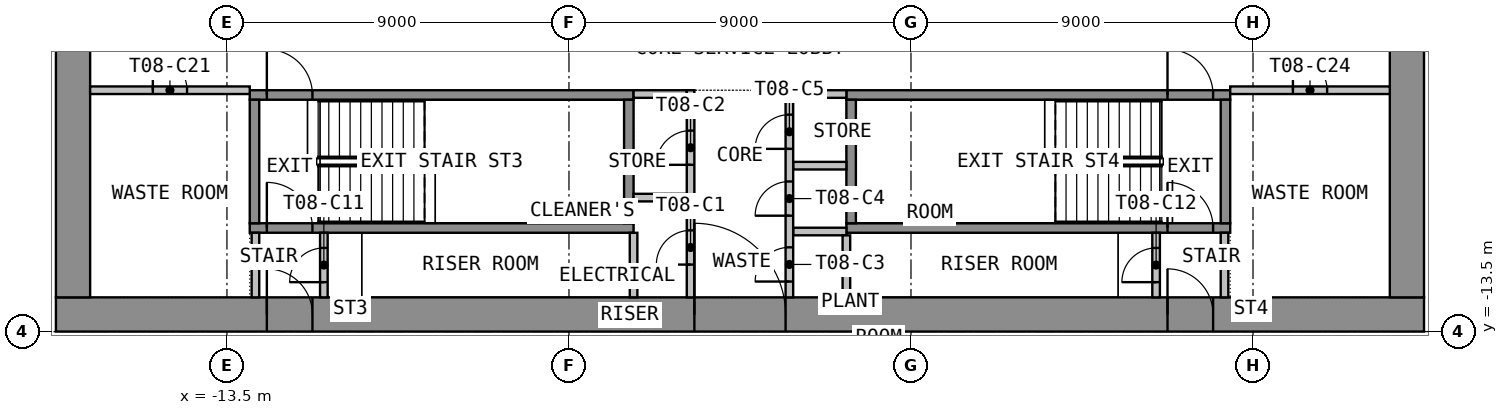
"""IFC4 building model, lengths in metres.
Left out: names, types, materials, properties, quantities, classifications, styles, units other than length and angle.
Written with IfcOpenShell. Run it as: python <this file> out.ifc"""

import sys

from ifc_helpers import new_model, si_unit, direction, frame, frame_2d, origin, place, context, subcontext, project, spatial, rectangle, extrude, element, fill, save


model = new_model("IFC4")
c1 = context("Model", 3, precision=1e-05, world=origin(), true_north=direction((0.0, 1.0)))
c2 = subcontext(c1, "Body", "Model", "MODEL_VIEW")
j1 = project(units=[si_unit("LENGTHUNIT", "METRE"), si_unit("PLANEANGLEUNIT", "RADIAN")], contexts=[c1])
p1 = place(None, origin())
s1 = spatial("IfcSite", under=j1, at=p1, CompositionType="ELEMENT")
p2 = place(p1, origin())
s2 = spatial("IfcBuilding", under=s1, at=p2, CompositionType="ELEMENT")
p3 = place(p2, frame((0.0, 0.0, 116.4)))
s3 = spatial("IfcBuildingStorey", under=s2, at=p3, CompositionType="ELEMENT", Elevation=116.4)
p4 = place(p3, frame((-18.0, -13.05, 0.0), z_axis=(0.0, 0.0, 1.0), x_axis=(1.0, 0.0, 0.0)))
e1 = element("IfcWall", 1, at=p4, inside=s3, PredefinedType="SHEAR", context=c2, shape_type="SweptSolid", body=[
    extrude(rectangle(XDim=36.0, YDim=0.9, at=frame_2d((18.0, 0.0))), origin(), (0.0, 0.0, 1.0), 3.525),
])
p5 = place(p4, frame((16.8, 0.0, 0.0)))
e2 = element("IfcOpeningElement", 2, at=p5, cuts=e1, PredefinedType="OPENING", context=c2, shape_type="SweptSolid", body=[
    extrude(rectangle(XDim=2.4, YDim=2.1, at=frame_2d((1.2, 1.05))), frame((0.0, 0.46, 0.0), z_axis=(0.0, -1.0, 0.0), x_axis=(1.0, 0.0, 0.0)), (0.0, 0.0, 1.0), 0.92),
])
p6 = place(p4, frame((5.55, 0.0, 0.0)))
e3 = element("IfcOpeningElement", 3, at=p6, cuts=e1, PredefinedType="OPENING", context=c2, shape_type="SweptSolid", body=[
    extrude(rectangle(XDim=1.2, YDim=2.1, at=frame_2d((0.6, 1.05))), frame((0.0, 0.46, 0.0), z_axis=(0.0, -1.0, 0.0), x_axis=(1.0, 0.0, 0.0)), (0.0, 0.0, 1.0), 0.92),
])
p7 = place(p4, frame((29.25, 0.0, 0.0)))
e4 = element("IfcOpeningElement", 4, at=p7, cuts=e1, PredefinedType="OPENING", context=c2, shape_type="SweptSolid", body=[
    extrude(rectangle(XDim=1.2, YDim=2.1, at=frame_2d((0.6, 1.05))), frame((0.0, 0.46, 0.0), z_axis=(0.0, -1.0, 0.0), x_axis=(1.0, 0.0, 0.0)), (0.0, 0.0, 1.0), 0.92),
])
p8 = place(p3, frame((-17.55, -12.6, 0.0), z_axis=(0.0, 0.0, 1.0), x_axis=(0.0, 1.0, 0.0)))
e5 = element("IfcWall", 5, at=p8, inside=s3, PredefinedType="SHEAR", context=c2, shape_type="SweptSolid", body=[
    extrude(rectangle(XDim=25.2, YDim=0.9, at=frame_2d((12.6, 0.0))), origin(), (0.0, 0.0, 1.0), 3.525),
])
p9 = place(p8, frame((11.4, 0.0, 0.0)))
e6 = element("IfcOpeningElement", 6, at=p9, cuts=e5, PredefinedType="OPENING", context=c2, shape_type="SweptSolid", body=[
    extrude(rectangle(XDim=2.4, YDim=2.1, at=frame_2d((1.2, 1.05))), frame((0.0, 0.46, 0.0), z_axis=(0.0, -1.0, 0.0), x_axis=(1.0, 0.0, 0.0)), (0.0, 0.0, 1.0), 0.92),
])
p10 = place(p3, frame((17.55, -12.6, 0.0), z_axis=(0.0, 0.0, 1.0), x_axis=(0.0, 1.0, 0.0)))
e7 = element("IfcWall", 7, at=p10, inside=s3, PredefinedType="SHEAR", context=c2, shape_type="SweptSolid", body=[
    extrude(rectangle(XDim=25.2, YDim=0.9, at=frame_2d((12.6, 0.0))), origin(), (0.0, 0.0, 1.0), 3.525),
])
p11 = place(p10, frame((11.4, 0.0, 0.0)))
e8 = element("IfcOpeningElement", 8, at=p11, cuts=e7, PredefinedType="OPENING", context=c2, shape_type="SweptSolid", body=[
    extrude(rectangle(XDim=2.4, YDim=2.1, at=frame_2d((1.2, 1.05))), frame((0.0, 0.46, 0.0), z_axis=(0.0, -1.0, 0.0), x_axis=(1.0, 0.0, 0.0)), (0.0, 0.0, 1.0), 0.92),
])
p12 = place(p3, frame((-12.9, -10.775, 0.0), z_axis=(0.0, 0.0, 1.0), x_axis=(1.0, 0.0, 0.0)))
e9 = element("IfcWall", 9, at=p12, inside=s3, PredefinedType="SHEAR", context=c2, shape_type="SweptSolid", body=[
    extrude(rectangle(XDim=10.1, YDim=0.25, at=frame_2d((5.05, 0.0))), origin(), (0.0, 0.0, 1.0), 3.525),
])
p13 = place(p12, frame((0.45, 0.0, 0.0)))
e10 = element("IfcOpeningElement", 10, at=p13, cuts=e9, PredefinedType="OPENING", context=c2, shape_type="SweptSolid", body=[
    extrude(rectangle(XDim=1.2, YDim=2.1, at=frame_2d((0.6, 1.05))), frame((0.0, 0.135, 0.0), z_axis=(0.0, -1.0, 0.0), x_axis=(1.0, 0.0, 0.0)), (0.0, 0.0, 1.0), 0.27),
])
p14 = place(p3, frame((-12.9, -7.275, 0.0), z_axis=(0.0, 0.0, 1.0), x_axis=(1.0, 0.0, 0.0)))
e11 = element("IfcWall", 11, at=p14, inside=s3, PredefinedType="SHEAR", context=c2, shape_type="SweptSolid", body=[
    extrude(rectangle(XDim=10.1, YDim=0.25, at=frame_2d((5.05, 0.0))), origin(), (0.0, 0.0, 1.0), 3.525),
])
p15 = place(p14, frame((0.45, 0.0, 0.0)))
e12 = element("IfcOpeningElement", 12, at=p15, cuts=e11, PredefinedType="OPENING", context=c2, shape_type="SweptSolid", body=[
    extrude(rectangle(XDim=1.2, YDim=2.1, at=frame_2d((0.6, 1.05))), frame((0.0, 0.135, 0.0), z_axis=(0.0, -1.0, 0.0), x_axis=(1.0, 0.0, 0.0)), (0.0, 0.0, 1.0), 0.27),
])
for number, where, z_axis, x_axis in (
    (13, (-12.775, -10.65, 0.0), (0.0, 0.0, 1.0), (0.0, 1.0, 0.0)),
    (14, (-2.925, -10.65, 0.0), (0.0, 0.0, 1.0), (0.0, 1.0, 0.0)),
):
    element("IfcWall", number, at=place(p3, frame(where, z_axis=z_axis, x_axis=x_axis)), inside=s3, PredefinedType="SHEAR", context=c2, shape_type="SweptSolid", body=[
        extrude(rectangle(XDim=3.25, YDim=0.25, at=frame_2d((1.625, 0.0))), origin(), (0.0, 0.0, 1.0), 3.525),
    ])
p16 = place(p3, frame((2.8, -10.775, 0.0), z_axis=(0.0, 0.0, 1.0), x_axis=(1.0, 0.0, 0.0)))
e15 = element("IfcWall", 15, at=p16, inside=s3, PredefinedType="SHEAR", context=c2, shape_type="SweptSolid", body=[
    extrude(rectangle(XDim=10.1, YDim=0.25, at=frame_2d((5.05, 0.0))), origin(), (0.0, 0.0, 1.0), 3.525),
])
p17 = place(p16, frame((8.45, 0.0, 0.0)))
e16 = element("IfcOpeningElement", 16, at=p17, cuts=e15, PredefinedType="OPENING", context=c2, shape_type="SweptSolid", body=[
    extrude(rectangle(XDim=1.2, YDim=2.1, at=frame_2d((0.6, 1.05))), frame((0.0, 0.135, 0.0), z_axis=(0.0, -1.0, 0.0), x_axis=(1.0, 0.0, 0.0)), (0.0, 0.0, 1.0), 0.27),
])
p18 = place(p3, frame((2.8, -7.275, 0.0), z_axis=(0.0, 0.0, 1.0), x_axis=(1.0, 0.0, 0.0)))
e17 = element("IfcWall", 17, at=p18, inside=s3, PredefinedType="SHEAR", context=c2, shape_type="SweptSolid", body=[
    extrude(rectangle(XDim=10.1, YDim=0.25, at=frame_2d((5.05, 0.0))), origin(), (0.0, 0.0, 1.0), 3.525),
])
p19 = place(p18, frame((8.45, 0.0, 0.0)))
e18 = element("IfcOpeningElement", 18, at=p19, cuts=e17, PredefinedType="OPENING", context=c2, shape_type="SweptSolid", body=[
    extrude(rectangle(XDim=1.2, YDim=2.1, at=frame_2d((0.6, 1.05))), frame((0.0, 0.135, 0.0), z_axis=(0.0, -1.0, 0.0), x_axis=(1.0, 0.0, 0.0)), (0.0, 0.0, 1.0), 0.27),
])
for number, where, z_axis, x_axis in (
    (19, (2.925, -10.65, 0.0), (0.0, 0.0, 1.0), (0.0, 1.0, 0.0)),
    (20, (12.775, -10.65, 0.0), (0.0, 0.0, 1.0), (0.0, 1.0, 0.0)),
):
    element("IfcWall", number, at=place(p3, frame(where, z_axis=z_axis, x_axis=x_axis)), inside=s3, PredefinedType="SHEAR", context=c2, shape_type="SweptSolid", body=[
        extrude(rectangle(XDim=3.25, YDim=0.25, at=frame_2d((1.625, 0.0))), origin(), (0.0, 0.0, 1.0), 3.525),
    ])
for number, where, z_axis, x_axis in (
    (21, (-2.8, -7.25, 0.0), (0.0, 0.0, 1.0), (1.0, 0.0, 0.0)),
    (22, (-2.8, -9.975, 0.0), (0.0, 0.0, 1.0), (1.0, 0.0, 0.0)),
    (23, (1.4, -7.25, 0.0), (0.0, 0.0, 1.0), (1.0, 0.0, 0.0)),
    (24, (1.4, -9.135, 0.0), (0.0, 0.0, 1.0), (1.0, 0.0, 0.0)),
    (25, (1.4, -10.867, 0.0), (0.0, 0.0, 1.0), (1.0, 0.0, 0.0)),
):
    element("IfcWall", number, at=place(p3, frame(where, z_axis=z_axis, x_axis=x_axis)), inside=s3, PredefinedType="PARTITIONING", context=c2, shape_type="SweptSolid", body=[
        extrude(rectangle(XDim=1.4, YDim=0.2, at=frame_2d((0.7, 0.0))), origin(), (0.0, 0.0, 1.0), 3.525),
    ])
p20 = place(p3, frame((-1.3, -12.6, 0.0), z_axis=(0.0, 0.0, 1.0), x_axis=(0.0, 1.0, 0.0)))
e26 = element("IfcWall", 26, at=p20, inside=s3, PredefinedType="PARTITIONING", context=c2, shape_type="SweptSolid", body=[
    extrude(rectangle(XDim=5.45, YDim=0.2, at=frame_2d((2.725, 0.0))), origin(), (0.0, 0.0, 1.0), 3.525),
])
p21 = place(p20, frame((0.863, 0.0, 0.0)))
e27 = element("IfcOpeningElement", 27, at=p21, cuts=e26, PredefinedType="OPENING", context=c2, shape_type="SweptSolid", body=[
    extrude(rectangle(XDim=0.9, YDim=2.1, at=frame_2d((0.45, 1.05))), frame((0.0, 0.11, 0.0), z_axis=(0.0, -1.0, 0.0), x_axis=(1.0, 0.0, 0.0)), (0.0, 0.0, 1.0), 0.22),
])
p22 = place(p20, frame((3.488, 0.0, 0.0)))
e28 = element("IfcOpeningElement", 28, at=p22, cuts=e26, PredefinedType="OPENING", context=c2, shape_type="SweptSolid", body=[
    extrude(rectangle(XDim=0.9, YDim=2.1, at=frame_2d((0.45, 1.05))), frame((0.0, 0.11, 0.0), z_axis=(0.0, -1.0, 0.0), x_axis=(1.0, 0.0, 0.0)), (0.0, 0.0, 1.0), 0.22),
])
p23 = place(p3, frame((1.3, -12.6, 0.0), z_axis=(0.0, 0.0, 1.0), x_axis=(0.0, 1.0, 0.0)))
e29 = element("IfcWall", 29, at=p23, inside=s3, PredefinedType="PARTITIONING", context=c2, shape_type="SweptSolid", body=[
    extrude(rectangle(XDim=5.45, YDim=0.2, at=frame_2d((2.725, 0.0))), origin(), (0.0, 0.0, 1.0), 3.525),
])
p24 = place(p23, frame((0.416, 0.0, 0.0)))
e30 = element("IfcOpeningElement", 30, at=p24, cuts=e29, PredefinedType="OPENING", context=c2, shape_type="SweptSolid", body=[
    extrude(rectangle(XDim=0.9, YDim=2.1, at=frame_2d((0.45, 1.05))), frame((0.0, 0.11, 0.0), z_axis=(0.0, -1.0, 0.0), x_axis=(1.0, 0.0, 0.0)), (0.0, 0.0, 1.0), 0.22),
])
p25 = place(p23, frame((2.149, 0.0, 0.0)))
e31 = element("IfcOpeningElement", 31, at=p25, cuts=e29, PredefinedType="OPENING", context=c2, shape_type="SweptSolid", body=[
    extrude(rectangle(XDim=0.9, YDim=2.1, at=frame_2d((0.45, 1.05))), frame((0.0, 0.11, 0.0), z_axis=(0.0, -1.0, 0.0), x_axis=(1.0, 0.0, 0.0)), (0.0, 0.0, 1.0), 0.22),
])
p26 = place(p23, frame((3.907, 0.0, 0.0)))
e32 = element("IfcOpeningElement", 32, at=p26, cuts=e29, PredefinedType="OPENING", context=c2, shape_type="SweptSolid", body=[
    extrude(rectangle(XDim=0.9, YDim=2.1, at=frame_2d((0.45, 1.05))), frame((0.0, 0.11, 0.0), z_axis=(0.0, -1.0, 0.0), x_axis=(1.0, 0.0, 0.0)), (0.0, 0.0, 1.0), 0.22),
])
p27 = place(p3, frame((-12.75, -12.6, 0.0), z_axis=(0.0, 0.0, 1.0), x_axis=(0.0, 1.0, 0.0)))
e33 = element("IfcWall", 33, at=p27, inside=s3, PredefinedType="PARTITIONING", context=c2, shape_type="SweptSolid", body=[
    extrude(rectangle(XDim=1.7, YDim=0.2, at=frame_2d((0.85, 0.0))), origin(), (0.0, 0.0, 1.0), 3.525),
])
p28 = place(p3, frame((-10.95, -12.6, 0.0), z_axis=(0.0, 0.0, 1.0), x_axis=(0.0, 1.0, 0.0)))
e34 = element("IfcWall", 34, at=p28, inside=s3, PredefinedType="PARTITIONING", context=c2, shape_type="SweptSolid", body=[
    extrude(rectangle(XDim=1.7, YDim=0.2, at=frame_2d((0.85, 0.0))), origin(), (0.0, 0.0, 1.0), 3.525),
])
p29 = place(p28, frame((0.4, 0.0, 0.0)))
e35 = element("IfcOpeningElement", 35, at=p29, cuts=e34, PredefinedType="OPENING", context=c2, shape_type="SweptSolid", body=[
    extrude(rectangle(XDim=0.9, YDim=2.1, at=frame_2d((0.45, 1.05))), frame((0.0, 0.11, 0.0), z_axis=(0.0, -1.0, 0.0), x_axis=(1.0, 0.0, 0.0)), (0.0, 0.0, 1.0), 0.22),
])
p30 = place(p3, frame((12.75, -12.6, 0.0), z_axis=(0.0, 0.0, 1.0), x_axis=(0.0, 1.0, 0.0)))
e36 = element("IfcWall", 36, at=p30, inside=s3, PredefinedType="PARTITIONING", context=c2, shape_type="SweptSolid", body=[
    extrude(rectangle(XDim=1.7, YDim=0.2, at=frame_2d((0.85, 0.0))), origin(), (0.0, 0.0, 1.0), 3.525),
])
p31 = place(p3, frame((10.95, -12.6, 0.0), z_axis=(0.0, 0.0, 1.0), x_axis=(0.0, 1.0, 0.0)))
e37 = element("IfcWall", 37, at=p31, inside=s3, PredefinedType="PARTITIONING", context=c2, shape_type="SweptSolid", body=[
    extrude(rectangle(XDim=1.7, YDim=0.2, at=frame_2d((0.85, 0.0))), origin(), (0.0, 0.0, 1.0), 3.525),
])
p32 = place(p31, frame((0.4, 0.0, 0.0)))
e38 = element("IfcOpeningElement", 38, at=p32, cuts=e37, PredefinedType="OPENING", context=c2, shape_type="SweptSolid", body=[
    extrude(rectangle(XDim=0.9, YDim=2.1, at=frame_2d((0.45, 1.05))), frame((0.0, 0.11, 0.0), z_axis=(0.0, -1.0, 0.0), x_axis=(1.0, 0.0, 0.0)), (0.0, 0.0, 1.0), 0.22),
])
p33 = place(p3, frame((-17.1, -7.15, 0.0), z_axis=(0.0, 0.0, 1.0), x_axis=(1.0, 0.0, 0.0)))
e39 = element("IfcWall", 39, at=p33, inside=s3, PredefinedType="PARTITIONING", context=c2, shape_type="SweptSolid", body=[
    extrude(rectangle(XDim=4.2, YDim=0.2, at=frame_2d((2.1, 0.0))), origin(), (0.0, 0.0, 1.0), 3.525),
])
p34 = place(p33, frame((1.65, 0.0, 0.0)))
e40 = element("IfcOpeningElement", 40, at=p34, cuts=e39, PredefinedType="OPENING", context=c2, shape_type="SweptSolid", body=[
    extrude(rectangle(XDim=0.9, YDim=2.1, at=frame_2d((0.45, 1.05))), frame((0.0, 0.11, 0.0), z_axis=(0.0, -1.0, 0.0), x_axis=(1.0, 0.0, 0.0)), (0.0, 0.0, 1.0), 0.22),
])
p35 = place(p3, frame((12.9, -7.15, 0.0), z_axis=(0.0, 0.0, 1.0), x_axis=(1.0, 0.0, 0.0)))
e41 = element("IfcWall", 41, at=p35, inside=s3, PredefinedType="PARTITIONING", context=c2, shape_type="SweptSolid", body=[
    extrude(rectangle(XDim=4.2, YDim=0.2, at=frame_2d((2.1, 0.0))), origin(), (0.0, 0.0, 1.0), 3.525),
])
p36 = place(p35, frame((1.65, 0.0, 0.0)))
e42 = element("IfcOpeningElement", 42, at=p36, cuts=e41, PredefinedType="OPENING", context=c2, shape_type="SweptSolid", body=[
    extrude(rectangle(XDim=0.9, YDim=2.1, at=frame_2d((0.45, 1.05))), frame((0.0, 0.11, 0.0), z_axis=(0.0, -1.0, 0.0), x_axis=(1.0, 0.0, 0.0)), (0.0, 0.0, 1.0), 0.22),
])
p37 = place(p3, frame((-2.8, -12.599, 0.0), z_axis=(0.0, 0.0, 1.0), x_axis=(0.0, 1.0, 0.0)))
e43 = element("IfcWall", 43, at=p37, inside=s3, PredefinedType="PARTITIONING", context=c2, shape_type="SweptSolid", body=[
    extrude(rectangle(XDim=1.698, YDim=0.2, at=frame_2d((0.849, 0.0))), origin(), (0.0, 0.0, 1.0), 3.525),
])
p38 = place(p3, frame((2.8, -10.969, 0.0), z_axis=(0.0, 0.0, 1.0), x_axis=(0.0, -1.0, 0.0)))
e44 = element("IfcWall", 44, at=p38, inside=s3, PredefinedType="PARTITIONING", context=c2, shape_type="SweptSolid", body=[
    extrude(rectangle(XDim=1.631, YDim=0.2, at=frame_2d((0.815, 0.0))), origin(), (0.0, 0.0, 1.0), 3.525),
])
p39 = place(p5, origin())
e45 = element("IfcDoor", 45, at=p39, inside=s3, OperationType="DOUBLE_DOOR_DOUBLE_SWING", PredefinedType="DOOR", context=c2, shape_type="SweptSolid", body=[
    extrude(rectangle(XDim=2.4, YDim=2.1, at=frame_2d((1.2, 1.05))), frame((0.0, 0.025, 0.0), z_axis=(0.0, -1.0, 0.0), x_axis=(1.0, 0.0, 0.0)), (0.0, 0.0, 1.0), 0.05),
])
fill(e2, e45)
p40 = place(p6, origin())
e46 = element("IfcDoor", 46, at=p40, inside=s3, OperationType="SINGLE_SWING_RIGHT", PredefinedType="DOOR", context=c2, shape_type="SweptSolid", body=[
    extrude(rectangle(XDim=1.2, YDim=2.1, at=frame_2d((0.6, 1.05))), frame((0.0, 0.025, 0.0), z_axis=(0.0, -1.0, 0.0), x_axis=(1.0, 0.0, 0.0)), (0.0, 0.0, 1.0), 0.05),
])
fill(e3, e46)
p41 = place(p7, origin())
e47 = element("IfcDoor", 47, at=p41, inside=s3, OperationType="SINGLE_SWING_RIGHT", PredefinedType="DOOR", context=c2, shape_type="SweptSolid", body=[
    extrude(rectangle(XDim=1.2, YDim=2.1, at=frame_2d((0.6, 1.05))), frame((0.0, 0.025, 0.0), z_axis=(0.0, -1.0, 0.0), x_axis=(1.0, 0.0, 0.0)), (0.0, 0.0, 1.0), 0.05),
])
fill(e4, e47)
p42 = place(p15, origin())
e48 = element("IfcDoor", 48, at=p42, inside=s3, OperationType="SINGLE_SWING_LEFT", PredefinedType="DOOR", context=c2, shape_type="SweptSolid", body=[
    extrude(rectangle(XDim=1.2, YDim=2.1, at=frame_2d((0.6, 1.05))), frame((0.0, 0.025, 0.0), z_axis=(0.0, -1.0, 0.0), x_axis=(1.0, 0.0, 0.0)), (0.0, 0.0, 1.0), 0.05),
])
fill(e12, e48)
p43 = place(p19, origin())
e49 = element("IfcDoor", 49, at=p43, inside=s3, OperationType="SINGLE_SWING_LEFT", PredefinedType="DOOR", context=c2, shape_type="SweptSolid", body=[
    extrude(rectangle(XDim=1.2, YDim=2.1, at=frame_2d((0.6, 1.05))), frame((0.0, 0.025, 0.0), z_axis=(0.0, -1.0, 0.0), x_axis=(1.0, 0.0, 0.0)), (0.0, 0.0, 1.0), 0.05),
])
fill(e18, e49)
p44 = place(p21, origin())
e50 = element("IfcDoor", 50, at=p44, inside=s3, OperationType="SINGLE_SWING_LEFT", PredefinedType="DOOR", context=c2, shape_type="SweptSolid", body=[
    extrude(rectangle(XDim=0.9, YDim=2.1, at=frame_2d((0.45, 1.05))), frame((0.0, 0.025, 0.0), z_axis=(0.0, -1.0, 0.0), x_axis=(1.0, 0.0, 0.0)), (0.0, 0.0, 1.0), 0.05),
])
fill(e27, e50)
p45 = place(p22, origin())
e51 = element("IfcDoor", 51, at=p45, inside=s3, OperationType="SINGLE_SWING_LEFT", PredefinedType="DOOR", context=c2, shape_type="SweptSolid", body=[
    extrude(rectangle(XDim=0.9, YDim=2.1, at=frame_2d((0.45, 1.05))), frame((0.0, 0.025, 0.0), z_axis=(0.0, -1.0, 0.0), x_axis=(1.0, 0.0, 0.0)), (0.0, 0.0, 1.0), 0.05),
])
fill(e28, e51)
p46 = place(p24, origin())
e52 = element("IfcDoor", 52, at=p46, inside=s3, OperationType="SINGLE_SWING_LEFT", PredefinedType="DOOR", context=c2, shape_type="SweptSolid", body=[
    extrude(rectangle(XDim=0.9, YDim=2.1, at=frame_2d((0.45, 1.05))), frame((0.0, 0.025, 0.0), z_axis=(0.0, -1.0, 0.0), x_axis=(1.0, 0.0, 0.0)), (0.0, 0.0, 1.0), 0.05),
])
fill(e30, e52)
p47 = place(p25, origin())
e53 = element("IfcDoor", 53, at=p47, inside=s3, OperationType="SINGLE_SWING_LEFT", PredefinedType="DOOR", context=c2, shape_type="SweptSolid", body=[
    extrude(rectangle(XDim=0.9, YDim=2.1, at=frame_2d((0.45, 1.05))), frame((0.0, 0.025, 0.0), z_axis=(0.0, -1.0, 0.0), x_axis=(1.0, 0.0, 0.0)), (0.0, 0.0, 1.0), 0.05),
])
fill(e31, e53)
p48 = place(p26, origin())
e54 = element("IfcDoor", 54, at=p48, inside=s3, OperationType="SINGLE_SWING_LEFT", PredefinedType="DOOR", context=c2, shape_type="SweptSolid", body=[
    extrude(rectangle(XDim=0.9, YDim=2.1, at=frame_2d((0.45, 1.05))), frame((0.0, 0.025, 0.0), z_axis=(0.0, -1.0, 0.0), x_axis=(1.0, 0.0, 0.0)), (0.0, 0.0, 1.0), 0.05),
])
fill(e32, e54)
p49 = place(p13, origin())
e55 = element("IfcDoor", 55, at=p49, inside=s3, OperationType="SINGLE_SWING_RIGHT", PredefinedType="DOOR", context=c2, shape_type="SweptSolid", body=[
    extrude(rectangle(XDim=1.2, YDim=2.1, at=frame_2d((0.6, 1.05))), frame((0.0, 0.025, 0.0), z_axis=(0.0, -1.0, 0.0), x_axis=(1.0, 0.0, 0.0)), (0.0, 0.0, 1.0), 0.05),
])
fill(e10, e55)
p50 = place(p29, origin())
e56 = element("IfcDoor", 56, at=p50, inside=s3, OperationType="SINGLE_SWING_LEFT", PredefinedType="DOOR", context=c2, shape_type="SweptSolid", body=[
    extrude(rectangle(XDim=0.9, YDim=2.1, at=frame_2d((0.45, 1.05))), frame((0.0, 0.025, 0.0), z_axis=(0.0, -1.0, 0.0), x_axis=(1.0, 0.0, 0.0)), (0.0, 0.0, 1.0), 0.05),
])
fill(e35, e56)
p51 = place(p17, origin())
e57 = element("IfcDoor", 57, at=p51, inside=s3, OperationType="SINGLE_SWING_RIGHT", PredefinedType="DOOR", context=c2, shape_type="SweptSolid", body=[
    extrude(rectangle(XDim=1.2, YDim=2.1, at=frame_2d((0.6, 1.05))), frame((0.0, 0.025, 0.0), z_axis=(0.0, -1.0, 0.0), x_axis=(1.0, 0.0, 0.0)), (0.0, 0.0, 1.0), 0.05),
])
fill(e16, e57)
p52 = place(p32, origin())
e58 = element("IfcDoor", 58, at=p52, inside=s3, OperationType="SINGLE_SWING_LEFT", PredefinedType="DOOR", context=c2, shape_type="SweptSolid", body=[
    extrude(rectangle(XDim=0.9, YDim=2.1, at=frame_2d((0.45, 1.05))), frame((0.0, 0.025, 0.0), z_axis=(0.0, -1.0, 0.0), x_axis=(1.0, 0.0, 0.0)), (0.0, 0.0, 1.0), 0.05),
])
fill(e38, e58)
p53 = place(p34, origin())
e59 = element("IfcDoor", 59, at=p53, inside=s3, OperationType="SINGLE_SWING_LEFT", PredefinedType="DOOR", context=c2, shape_type="SweptSolid", body=[
    extrude(rectangle(XDim=0.9, YDim=2.1, at=frame_2d((0.45, 1.05))), frame((0.0, 0.025, 0.0), z_axis=(0.0, -1.0, 0.0), x_axis=(1.0, 0.0, 0.0)), (0.0, 0.0, 1.0), 0.05),
])
fill(e40, e59)
p54 = place(p36, origin())
e60 = element("IfcDoor", 60, at=p54, inside=s3, OperationType="SINGLE_SWING_LEFT", PredefinedType="DOOR", context=c2, shape_type="SweptSolid", body=[
    extrude(rectangle(XDim=0.9, YDim=2.1, at=frame_2d((0.45, 1.05))), frame((0.0, 0.025, 0.0), z_axis=(0.0, -1.0, 0.0), x_axis=(1.0, 0.0, 0.0)), (0.0, 0.0, 1.0), 0.05),
])
fill(e42, e60)
save(model, sys.argv[1])
